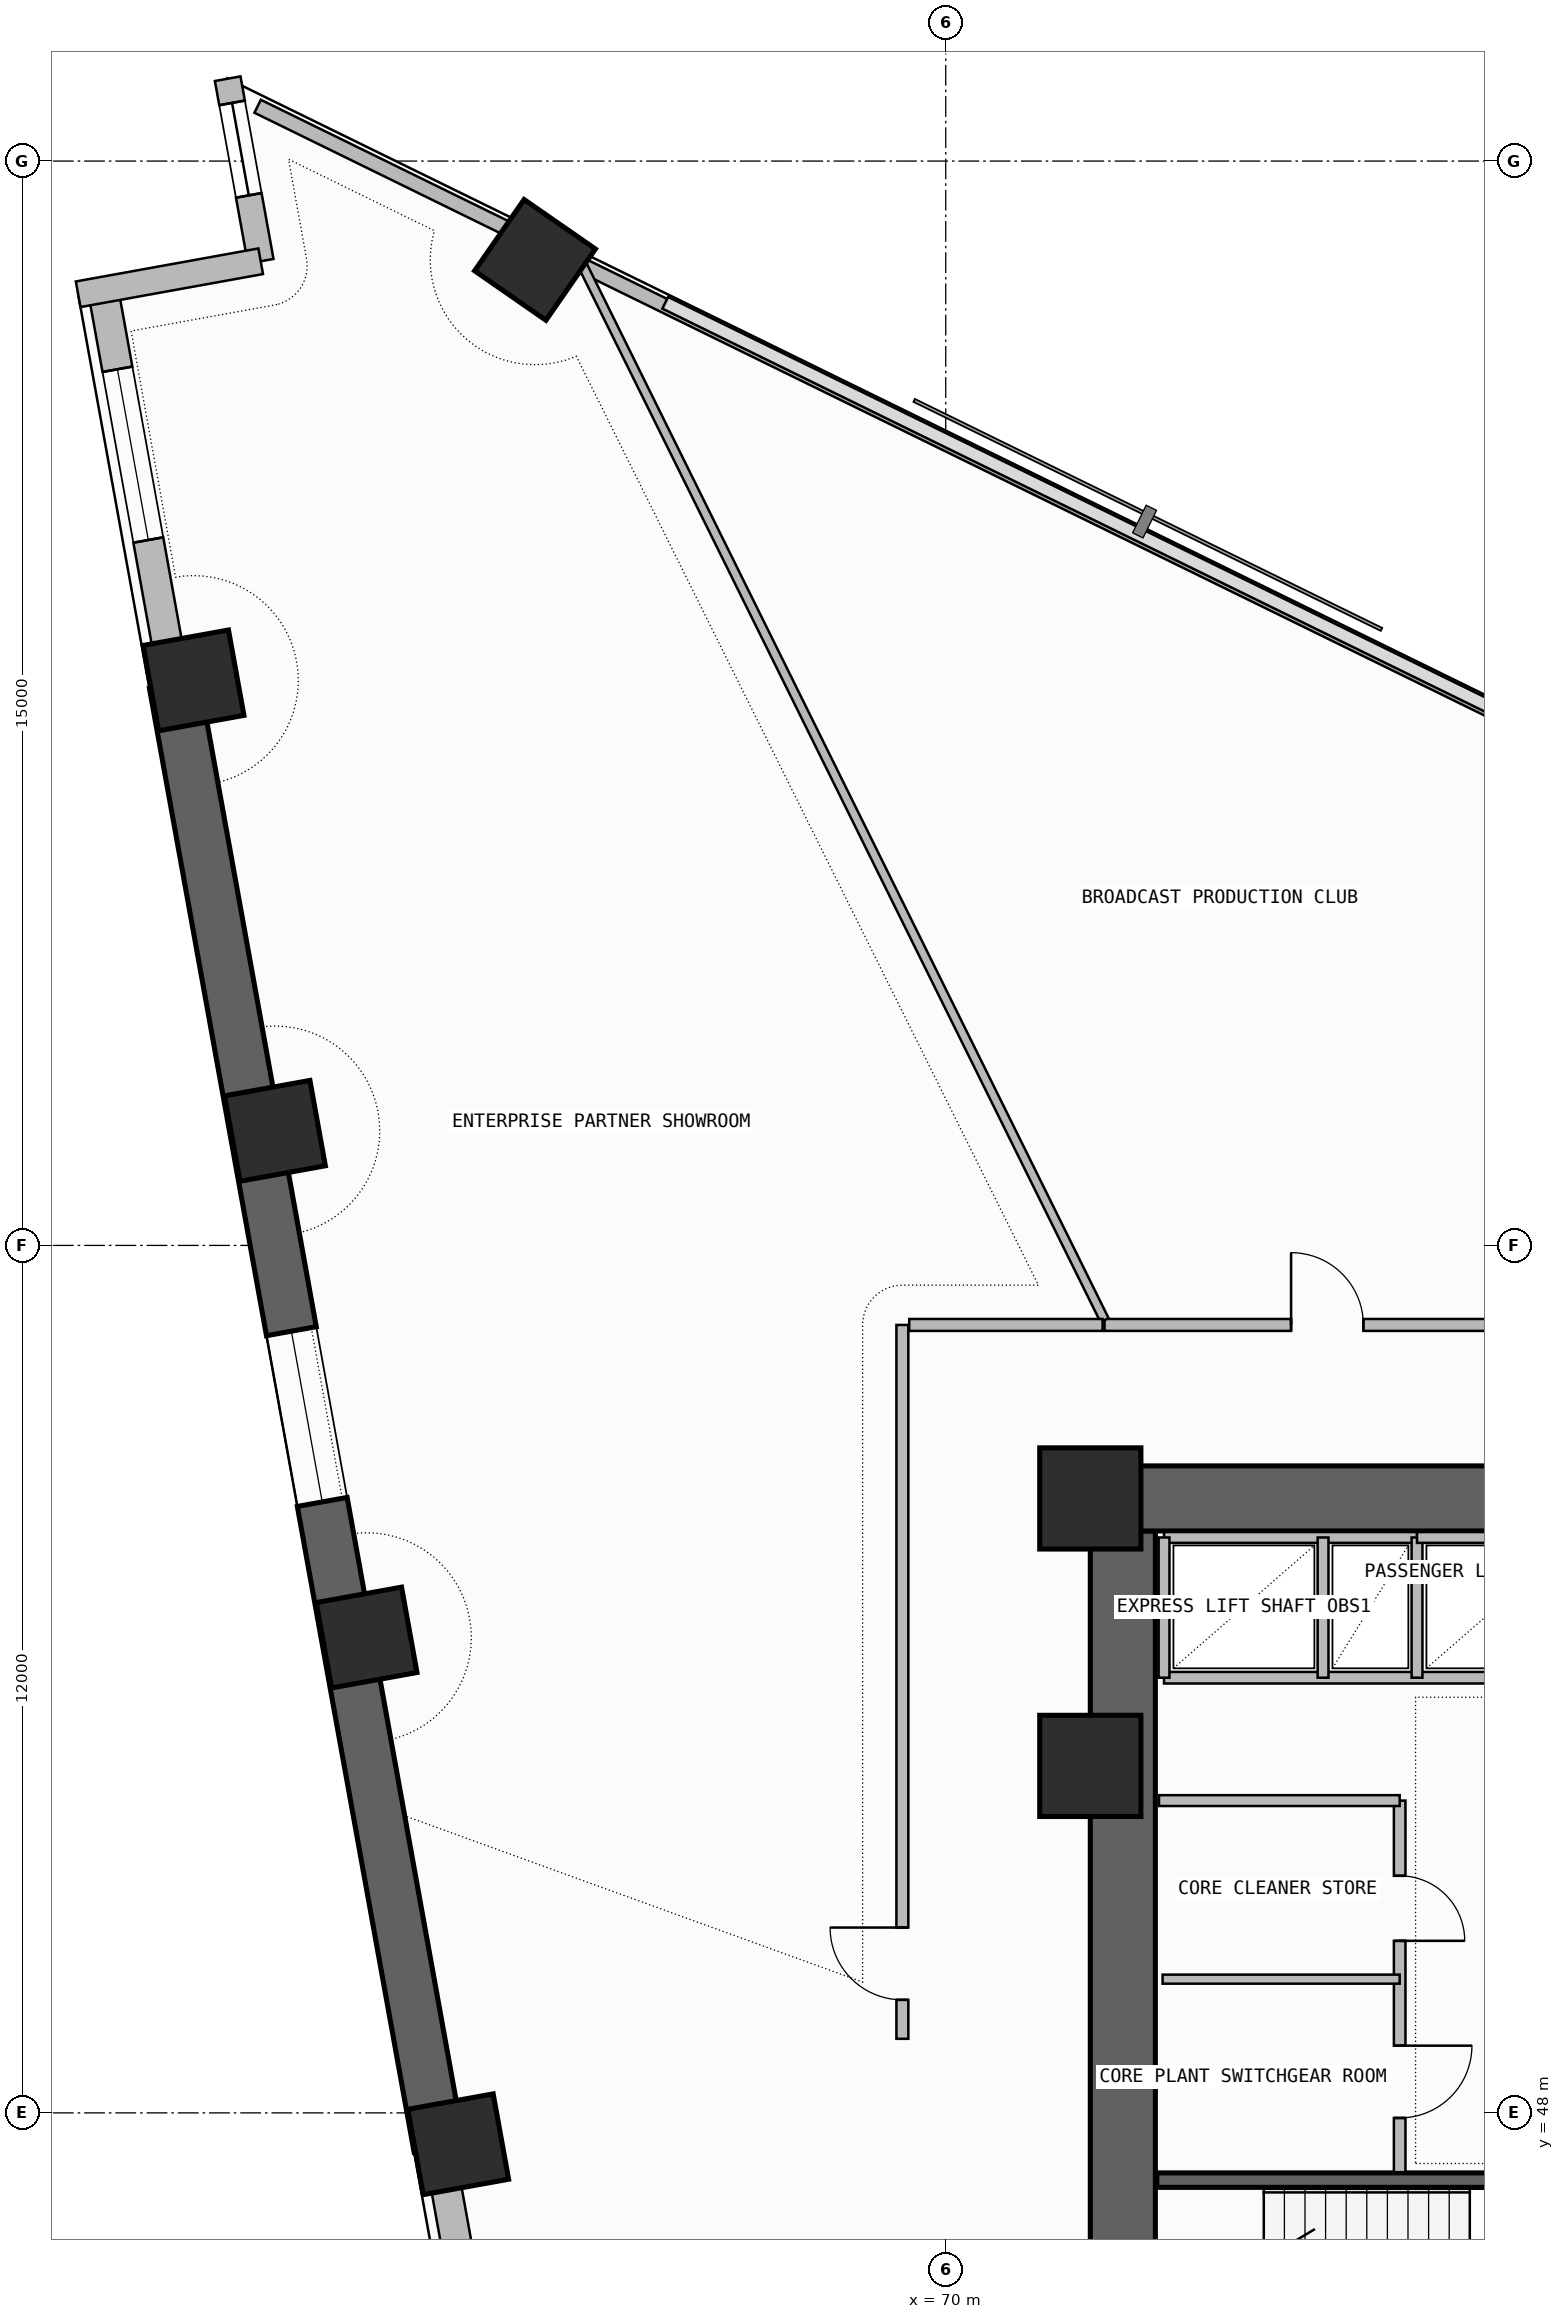
"""IFC4 building model, lengths in metres.
Left out: names, types, materials, properties, quantities, classifications, styles, units other than length and angle.
Written with IfcOpenShell. Run it as: python <this file> out.ifc"""

import sys

from ifc_helpers import new_model, si_unit, direction, frame, frame_2d, origin, origin_2d, place, context, subcontext, project, spatial, rectangle, extrude, element, fill, save


model = new_model("IFC4")
c1 = context("Model", 3, precision=1e-05, world=origin(), true_north=direction((0.0, 1.0)))
c2 = subcontext(c1, "Body", "Model", "MODEL_VIEW")
j1 = project(units=[si_unit("LENGTHUNIT", "METRE"), si_unit("PLANEANGLEUNIT", "RADIAN")], contexts=[c1])
p1 = place(None, origin())
s1 = spatial("IfcSite", under=j1, at=p1, CompositionType="ELEMENT")
p2 = place(p1, origin())
s2 = spatial("IfcBuilding", under=s1, at=p2, CompositionType="ELEMENT")
p3 = place(p2, frame((0.0, 0.0, 120.9)))
s3 = spatial("IfcBuildingStorey", under=s2, at=p3, CompositionType="ELEMENT", Elevation=120.9)
p4 = place(p3, frame((72.45, 43.35, -0.26), z_axis=(0.0, 0.0, 1.0), x_axis=(0.0, 1.0, 0.0)))
e1 = element("IfcWall", 1, at=p4, inside=s3, PredefinedType="SHEAR", context=c2, shape_type="SweptSolid", body=[
    extrude(rectangle(XDim=12.7, YDim=0.9, at=frame_2d((6.35, 0.0))), origin(), (0.0, 0.0, 1.0), 3.6),
])
p5 = place(p4, frame((1.35, 0.0, 0.26)))
e2 = element("IfcOpeningElement", 2, at=p5, cuts=e1, PredefinedType="OPENING", context=c2, shape_type="SweptSolid", body=[
    extrude(rectangle(XDim=1.2, YDim=2.2, at=frame_2d((0.6, 1.1))), frame((0.0, 0.46, 0.0), z_axis=(0.0, -1.0, 0.0), x_axis=(1.0, 0.0, 0.0)), (0.0, 0.0, 1.0), 0.92),
])
p6 = place(p3, frame((72.0, 56.5, -0.26), z_axis=(0.0, 0.0, 1.0), x_axis=(1.0, 0.0, 0.0)))
e3 = element("IfcWall", 3, at=p6, inside=s3, PredefinedType="SHEAR", context=c2, shape_type="SweptSolid", body=[
    extrude(rectangle(XDim=13.9, YDim=0.9, at=frame_2d((6.95, 0.0))), origin(), (0.0, 0.0, 1.0), 3.6),
])
for number, where, z_axis, x_axis in (
    (4, (72.0, 52.8, 0.0), (0.0, 0.0, 1.0), (1.0, 0.0, 0.0)),
    (5, (72.0, 56.5, 0.0), (0.0, 0.0, 1.0), (1.0, 0.0, 0.0)),
):
    element("IfcColumn", number, at=place(p3, frame(where, z_axis=z_axis, x_axis=x_axis)), inside=s3, PredefinedType="COLUMN", context=c2, shape_type="SweptSolid", body=[
        extrude(rectangle(XDim=1.4, YDim=1.4, at=origin_2d()), origin(), (0.0, 0.0, 1.0), 3.6),
    ])
for number, where, z_axis, x_axis in (
    (6, (64.318, 73.633, 0.0), (0.0, 0.0, 1.0), (0.57, 0.822, 0.0)),
    (7, (59.594, 67.816, 0.0), (0.0, 0.0, 1.0), (-0.178, 0.984, 0.0)),
    (8, (60.72, 61.585, 0.0), (0.0, 0.0, 1.0), (-0.178, 0.984, 0.0)),
    (9, (61.988, 54.575, 0.0), (0.0, 0.0, 1.0), (-0.178, 0.984, 0.0)),
    (10, (63.255, 47.566, 0.0), (0.0, 0.0, 1.0), (-0.178, 0.984, 0.0)),
):
    element("IfcColumn", number, at=place(p3, frame(where, z_axis=z_axis, x_axis=x_axis)), inside=s3, PredefinedType="COLUMN", context=c2, shape_type="SweptSolid", body=[
        extrude(rectangle(XDim=1.2, YDim=1.2, at=origin_2d()), origin(), (0.0, 0.0, 1.0), 3.6),
    ])
p7 = place(p3, frame((58.342, 73.22, 0.0), z_axis=(0.0, 0.0, 1.0), x_axis=(0.177981837245, -0.984033772597, 0.0)))
e11 = element("IfcWall", 11, at=p7, inside=s3, PredefinedType="SOLIDWALL", context=c2, shape_type="SweptSolid", body=[
    extrude(rectangle(XDim=5.54, YDim=0.42, at=frame_2d((2.77, 0.0))), origin(), (0.0, 0.0, 1.0), 2.725),
])
p8 = place(p7, frame((1.118, 0.0, 1.2)))
e12 = element("IfcOpeningElement", 12, at=p8, cuts=e11, PredefinedType="OPENING", context=c2, shape_type="SweptSolid", body=[
    extrude(rectangle(XDim=2.4, YDim=0.9, at=frame_2d((1.2, 0.45))), frame((0.0, 0.22, 0.0), z_axis=(0.0, -1.0, 0.0), x_axis=(1.0, 0.0, 0.0)), (0.0, 0.0, 1.0), 0.44),
])
p9 = place(p3, frame((59.328, 67.768, -0.26), z_axis=(0.0, 0.0, 1.0), x_axis=(0.177933213615, -0.984042565895, 0.0)))
e13 = element("IfcWall", 13, at=p9, inside=s3, PredefinedType="SHEAR", context=c2, shape_type="SweptSolid", body=[
    extrude(rectangle(XDim=20.579, YDim=0.7, at=frame_2d((10.289, 0.0))), origin(), (0.0, 0.0, 1.0), 3.6),
])
p10 = place(p9, frame((9.1, 0.0, 1.2)))
e14 = element("IfcOpeningElement", 14, at=p10, cuts=e13, PredefinedType="OPENING", context=c2, shape_type="SweptSolid", body=[
    extrude(rectangle(XDim=2.4, YDim=0.9, at=frame_2d((1.2, 0.45))), frame((0.0, 0.36, 0.0), z_axis=(0.0, -1.0, 0.0), x_axis=(1.0, 0.0, 0.0)), (0.0, 0.0, 1.0), 0.72),
])
p11 = place(p3, frame((62.99, 47.518, 0.0), z_axis=(0.0, 0.0, 1.0), x_axis=(0.177948058674, -0.984039881516, 0.0)))
e15 = element("IfcWall", 15, at=p11, inside=s3, PredefinedType="SOLIDWALL", context=c2, shape_type="SweptSolid", body=[
    extrude(rectangle(XDim=13.455, YDim=0.42, at=frame_2d((6.728, 0.0))), origin(), (0.0, 0.0, 1.0), 2.725),
])
p12 = place(p11, frame((1.945, 0.0, 1.2)))
e16 = element("IfcOpeningElement", 16, at=p12, cuts=e15, PredefinedType="OPENING", context=c2, shape_type="SweptSolid", body=[
    extrude(rectangle(XDim=2.4, YDim=0.9, at=frame_2d((1.2, 0.45))), frame((0.0, 0.22, 0.0), z_axis=(0.0, -1.0, 0.0), x_axis=(1.0, 0.0, 0.0)), (0.0, 0.0, 1.0), 0.44),
])
p13 = place(p3, frame((60.066, 76.139, 0.0), z_axis=(0.0, 0.0, 1.0), x_axis=(0.177897493713, -0.984049024048, 0.0)))
e17 = element("IfcWall", 17, at=p13, inside=s3, PredefinedType="SOLIDWALL", context=c2, shape_type="SweptSolid", body=[
    extrude(rectangle(XDim=2.566, YDim=0.36, at=frame_2d((1.283, 0.0))), origin(), (0.0, 0.0, 1.0), 3.34),
])
p14 = place(p13, frame((0.34, 0.0, 0.45)))
e18 = element("IfcOpeningElement", 18, at=p14, cuts=e17, PredefinedType="OPENING", context=c2, shape_type="SweptSolid", body=[
    extrude(rectangle(XDim=1.3, YDim=2.4, at=frame_2d((0.65, 1.2))), frame((0.0, 0.19, 0.0), z_axis=(0.0, -1.0, 0.0), x_axis=(1.0, 0.0, 0.0)), (0.0, 0.0, 1.0), 0.38),
])
p15 = place(p3, frame((60.523, 73.614, 0.0), z_axis=(0.0, 0.0, 1.0), x_axis=(-0.984046012923, -0.177914149102, 0.0)))
e19 = element("IfcWall", 19, at=p15, inside=s3, PredefinedType="SOLIDWALL", context=c2, shape_type="SweptSolid", body=[
    extrude(rectangle(XDim=2.566, YDim=0.36, at=frame_2d((1.283, 0.0))), origin(), (0.0, 0.0, 1.0), 3.34),
])
p16 = place(p3, frame((88.921, 61.823, 0.0), z_axis=(0.0, 0.0, 1.0), x_axis=(-0.897993533426, 0.440008652103, 0.0)))
e20 = element("IfcWall", 20, at=p16, inside=s3, PredefinedType="PARAPET", context=c2, shape_type="SweptSolid", body=[
    extrude(rectangle(XDim=26.864, YDim=0.2, at=frame_2d((13.432, 0.0))), origin(), (0.0, 0.0, 1.0), 1.15),
])
p17 = place(p3, frame((64.032, 74.018, 0.0), z_axis=(0.0, 0.0, 1.0), x_axis=(-0.89799103332, 0.440013754417, 0.0)))
e21 = element("IfcWall", 21, at=p17, inside=s3, PredefinedType="PARAPET", context=c2, shape_type="SweptSolid", body=[
    extrude(rectangle(XDim=3.955, YDim=0.2, at=frame_2d((1.978, 0.0))), origin(), (0.0, 0.0, 1.0), 1.15),
])
p18 = place(p3, frame((72.92, 47.07, -0.26), z_axis=(0.0, 0.0, 1.0), x_axis=(1.0, 0.0, 0.0)))
e22 = element("IfcWall", 22, at=p18, inside=s3, PredefinedType="SOLIDWALL", context=c2, shape_type="SweptSolid", body=[
    extrude(rectangle(XDim=7.7, YDim=0.2, at=frame_2d((3.85, 0.0))), origin(), (0.0, 0.0, 1.0), 3.6),
])
p19 = place(p3, frame((76.28, 47.18, 0.0), z_axis=(0.0, 0.0, 1.0), x_axis=(0.0, 1.0, 0.0)))
e23 = element("IfcWall", 23, at=p19, inside=s3, PredefinedType="SOLIDWALL", context=c2, shape_type="SweptSolid", body=[
    extrude(rectangle(XDim=5.14, YDim=0.16, at=frame_2d((2.57, 0.0))), origin(), (0.0, 0.0, 1.0), 3.34),
])
p20 = place(p19, frame((0.75, 0.0, 0.0)))
e24 = element("IfcOpeningElement", 24, at=p20, cuts=e23, PredefinedType="OPENING", context=c2, shape_type="SweptSolid", body=[
    extrude(rectangle(XDim=1.0, YDim=2.2, at=frame_2d((0.5, 1.1))), frame((0.0, 0.09, 0.0), z_axis=(0.0, -1.0, 0.0), x_axis=(1.0, 0.0, 0.0)), (0.0, 0.0, 1.0), 0.18),
])
p21 = place(p19, frame((3.2, 0.0, 0.0)))
e25 = element("IfcOpeningElement", 25, at=p21, cuts=e23, PredefinedType="OPENING", context=c2, shape_type="SweptSolid", body=[
    extrude(rectangle(XDim=0.9, YDim=2.1, at=frame_2d((0.45, 1.05))), frame((0.0, 0.09, 0.0), z_axis=(0.0, -1.0, 0.0), x_axis=(1.0, 0.0, 0.0)), (0.0, 0.0, 1.0), 0.18),
])
p22 = place(p3, frame((72.95, 52.32, 0.0), z_axis=(0.0, 0.0, 1.0), x_axis=(1.0, 0.0, 0.0)))
e26 = element("IfcWall", 26, at=p22, inside=s3, PredefinedType="SOLIDWALL", context=c2, shape_type="SweptSolid", body=[
    extrude(rectangle(XDim=3.33, YDim=0.15, at=frame_2d((1.665, 0.0))), origin(), (0.0, 0.0, 1.0), 3.34),
])
p23 = place(p3, frame((73.0, 49.85, 0.0), z_axis=(0.0, 0.0, 1.0), x_axis=(1.0, 0.0, 0.0)))
e27 = element("IfcWall", 27, at=p23, inside=s3, PredefinedType="PARTITIONING", context=c2, shape_type="SweptSolid", body=[
    extrude(rectangle(XDim=3.28, YDim=0.125, at=frame_2d((1.64, 0.0))), origin(), (0.0, 0.0, 1.0), 3.34),
])
p24 = place(p3, frame((73.02, 54.02, 0.0), z_axis=(0.0, 0.0, 1.0), x_axis=(1.0, 0.0, 0.0)))
e28 = element("IfcWall", 28, at=p24, inside=s3, PredefinedType="SOLIDWALL", context=c2, shape_type="SweptSolid", body=[
    extrude(rectangle(XDim=12.08, YDim=0.16, at=frame_2d((6.04, 0.0))), origin(), (0.0, 0.0, 1.0), 3.34),
])
p25 = place(p3, frame((73.02, 55.96, 0.0), z_axis=(0.0, 0.0, 1.0), x_axis=(1.0, 0.0, 0.0)))
e29 = element("IfcWall", 29, at=p25, inside=s3, PredefinedType="SOLIDWALL", context=c2, shape_type="SweptSolid", body=[
    extrude(rectangle(XDim=3.5, YDim=0.15, at=frame_2d((1.75, 0.0))), origin(), (0.0, 0.0, 1.0), 3.34),
])
p26 = place(p3, frame((73.02, 54.02, 0.0), z_axis=(0.0, 0.0, 1.0), x_axis=(0.0, 1.0, 0.0)))
e30 = element("IfcWall", 30, at=p26, inside=s3, PredefinedType="PLUMBINGWALL", context=c2, shape_type="SweptSolid", body=[
    extrude(rectangle(XDim=1.94, YDim=0.15, at=frame_2d((0.97, 0.0))), origin(), (0.0, 0.0, 1.0), 3.34),
])
p27 = place(p3, frame((76.52, 54.02, 0.0), z_axis=(0.0, 0.0, 1.0), x_axis=(0.0, 1.0, 0.0)))
e31 = element("IfcWall", 31, at=p27, inside=s3, PredefinedType="SOLIDWALL", context=c2, shape_type="SweptSolid", body=[
    extrude(rectangle(XDim=1.94, YDim=0.15, at=frame_2d((0.97, 0.0))), origin(), (0.0, 0.0, 1.0), 3.34),
])
p28 = place(p3, frame((75.22, 54.02, 0.0), z_axis=(0.0, 0.0, 1.0), x_axis=(0.0, 1.0, 0.0)))
e32 = element("IfcWall", 32, at=p28, inside=s3, PredefinedType="PLUMBINGWALL", context=c2, shape_type="SweptSolid", body=[
    extrude(rectangle(XDim=1.94, YDim=0.15, at=frame_2d((0.97, 0.0))), origin(), (0.0, 0.0, 1.0), 3.34),
])
p29 = place(p3, frame((76.52, 55.96, 0.0), z_axis=(0.0, 0.0, 1.0), x_axis=(1.0, 0.0, 0.0)))
e33 = element("IfcWall", 33, at=p29, inside=s3, PredefinedType="SOLIDWALL", context=c2, shape_type="SweptSolid", body=[
    extrude(rectangle(XDim=6.7, YDim=0.15, at=frame_2d((3.35, 0.0))), origin(), (0.0, 0.0, 1.0), 3.34),
])
p30 = place(p3, frame((78.358, 58.9, 0.0), z_axis=(0.0, 0.0, 1.0), x_axis=(-1.0, 0.0, 0.0)))
e34 = element("IfcWall", 34, at=p30, inside=s3, PredefinedType="PARTITIONING", context=c2, shape_type="SweptSolid", body=[
    extrude(rectangle(XDim=6.162, YDim=0.165, at=frame_2d((3.081, 0.0))), origin(), (0.0, 0.0, 1.0), 3.34),
])
p31 = place(p30, frame((2.581, 0.0, 0.0)))
e35 = element("IfcOpeningElement", 35, at=p31, cuts=e34, PredefinedType="OPENING", context=c2, shape_type="SweptSolid", body=[
    extrude(rectangle(XDim=1.0, YDim=2.2, at=frame_2d((0.5, 1.1))), frame((0.0, 0.093, 0.0), z_axis=(0.0, -1.0, 0.0), x_axis=(1.0, 0.0, 0.0)), (0.0, 0.0, 1.0), 0.185),
])
p32 = place(p3, frame((72.197, 58.967, 0.0), z_axis=(0.0, 0.0, 1.0), x_axis=(-0.443596581614, 0.896226574467, 0.0)))
e36 = element("IfcWall", 36, at=p32, inside=s3, PredefinedType="PARTITIONING", context=c2, shape_type="SweptSolid", body=[
    extrude(rectangle(XDim=16.54, YDim=0.125, at=frame_2d((8.27, 0.0))), origin(), (0.0, 0.0, 1.0), 3.34),
])
p33 = place(p3, frame((69.4, 58.9, 0.0), z_axis=(0.0, 0.0, 1.0), x_axis=(0.0, -1.0, 0.0)))
e37 = element("IfcWall", 37, at=p33, inside=s3, PredefinedType="PARTITIONING", context=c2, shape_type="SweptSolid", body=[
    extrude(rectangle(XDim=9.875, YDim=0.165, at=frame_2d((4.938, 0.0))), origin(), (0.0, 0.0, 1.0), 2.725),
])
p34 = place(p33, frame((8.336, 0.0, 0.0)))
e38 = element("IfcOpeningElement", 38, at=p34, cuts=e37, PredefinedType="OPENING", context=c2, shape_type="SweptSolid", body=[
    extrude(rectangle(XDim=1.0, YDim=2.2, at=frame_2d((0.5, 1.1))), frame((0.0, 0.093, 0.0), z_axis=(0.0, -1.0, 0.0), x_axis=(1.0, 0.0, 0.0)), (0.0, 0.0, 1.0), 0.185),
])
p35 = place(p3, frame((72.17, 58.9, 0.0), z_axis=(0.0, 0.0, 1.0), x_axis=(-1.0, 0.0, 0.0)))
e39 = element("IfcWall", 39, at=p35, inside=s3, PredefinedType="PARTITIONING", context=c2, shape_type="SweptSolid", body=[
    extrude(rectangle(XDim=2.676, YDim=0.165, at=frame_2d((1.338, 0.0))), origin(), (0.0, 0.0, 1.0), 2.725),
])
p36 = place(p8, origin())
e40 = element("IfcWindow", 40, at=p36, inside=s3, PartitioningType="SINGLE_PANEL", PredefinedType="WINDOW", context=c2, shape_type="SweptSolid", body=[
    extrude(rectangle(XDim=2.4, YDim=0.9, at=frame_2d((1.2, 0.45))), frame((0.0, 0.03, 0.0), z_axis=(0.0, -1.0, 0.0), x_axis=(1.0, 0.0, 0.0)), (0.0, 0.0, 1.0), 0.06),
])
fill(e12, e40)
p37 = place(p10, origin())
e41 = element("IfcWindow", 41, at=p37, inside=s3, PartitioningType="SINGLE_PANEL", PredefinedType="WINDOW", context=c2, shape_type="SweptSolid", body=[
    extrude(rectangle(XDim=2.4, YDim=0.9, at=frame_2d((1.2, 0.45))), frame((0.0, 0.03, 0.0), z_axis=(0.0, -1.0, 0.0), x_axis=(1.0, 0.0, 0.0)), (0.0, 0.0, 1.0), 0.06),
])
fill(e14, e41)
p38 = place(p14, origin())
e42 = element("IfcWindow", 42, at=p38, inside=s3, PartitioningType="SINGLE_PANEL", PredefinedType="WINDOW", context=c2, shape_type="SweptSolid", body=[
    extrude(rectangle(XDim=1.3, YDim=2.4, at=frame_2d((0.65, 1.2))), frame((0.0, 0.03, 0.0), z_axis=(0.0, -1.0, 0.0), x_axis=(1.0, 0.0, 0.0)), (0.0, 0.0, 1.0), 0.06),
])
fill(e18, e42)
p39 = place(p20, frame((1.0, 0.0, 0.0), z_axis=(0.0, 0.0, 1.0), x_axis=(-1.0, 0.0, 0.0)))
e43 = element("IfcDoor", 43, at=p39, inside=s3, OperationType="SINGLE_SWING_LEFT", PredefinedType="DOOR", context=c2, shape_type="SweptSolid", body=[
    extrude(rectangle(XDim=1.0, YDim=2.2, at=frame_2d((0.5, 1.1))), frame((0.0, 0.025, 0.0), z_axis=(0.0, -1.0, 0.0), x_axis=(1.0, 0.0, 0.0)), (0.0, 0.0, 1.0), 0.05),
])
fill(e24, e43)
p40 = place(p21, frame((0.9, 0.0, 0.0), z_axis=(0.0, 0.0, 1.0), x_axis=(-1.0, 0.0, 0.0)))
e44 = element("IfcDoor", 44, at=p40, inside=s3, OperationType="SINGLE_SWING_RIGHT", PredefinedType="DOOR", context=c2, shape_type="SweptSolid", body=[
    extrude(rectangle(XDim=0.9, YDim=2.1, at=frame_2d((0.45, 1.05))), frame((0.0, 0.025, 0.0), z_axis=(0.0, -1.0, 0.0), x_axis=(1.0, 0.0, 0.0)), (0.0, 0.0, 1.0), 0.05),
])
fill(e25, e44)
p41 = place(p31, frame((1.0, 0.0, 0.0), z_axis=(0.0, 0.0, 1.0), x_axis=(-1.0, 0.0, 0.0)))
e45 = element("IfcDoor", 45, at=p41, inside=s3, OperationType="SINGLE_SWING_LEFT", PredefinedType="DOOR", context=c2, shape_type="SweptSolid", body=[
    extrude(rectangle(XDim=1.0, YDim=2.2, at=frame_2d((0.5, 1.1))), frame((0.0, 0.025, 0.0), z_axis=(0.0, -1.0, 0.0), x_axis=(1.0, 0.0, 0.0)), (0.0, 0.0, 1.0), 0.05),
])
fill(e35, e45)
p42 = place(p34, frame((1.0, 0.0, 0.0), z_axis=(0.0, 0.0, 1.0), x_axis=(-1.0, 0.0, 0.0)))
e46 = element("IfcDoor", 46, at=p42, inside=s3, OperationType="SINGLE_SWING_RIGHT", PredefinedType="DOOR", context=c2, shape_type="SweptSolid", body=[
    extrude(rectangle(XDim=1.0, YDim=2.2, at=frame_2d((0.5, 1.1))), frame((0.0, 0.025, 0.0), z_axis=(0.0, -1.0, 0.0), x_axis=(1.0, 0.0, 0.0)), (0.0, 0.0, 1.0), 0.05),
])
fill(e38, e46)
save(model, sys.argv[1])
